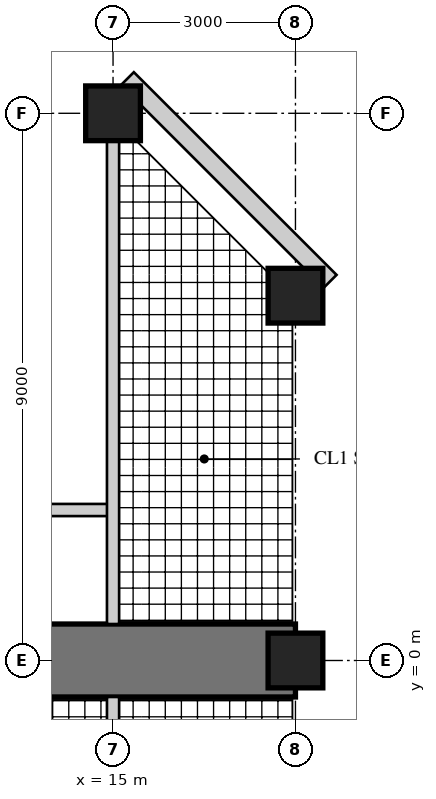
"""IFC4 building model, lengths in metres.
Left out: names, types, materials, properties, quantities, classifications, styles, units other than length and angle.
Written with IfcOpenShell. Run it as: python <this file> out.ifc"""

import sys

from ifc_helpers import new_model, si_unit, direction, frame, frame_2d, origin, origin_2d, place, context, subcontext, project, spatial, rectangle, hollow_rectangle, extrude, element, fill, save


model = new_model("IFC4")
c1 = context("Model", 3, precision=1e-05, world=origin(), true_north=direction((0.0, 1.0)))
c2 = subcontext(c1, "Body", "Model", "MODEL_VIEW")
j1 = project(units=[si_unit("LENGTHUNIT", "METRE"), si_unit("PLANEANGLEUNIT", "RADIAN")], contexts=[c1])
p1 = place(None, origin())
s1 = spatial("IfcSite", under=j1, at=p1, CompositionType="ELEMENT")
p2 = place(p1, origin())
s2 = spatial("IfcBuilding", under=s1, at=p2, CompositionType="ELEMENT")
p3 = place(p2, frame((0.0, 0.0, 179.7)))
s3 = spatial("IfcBuildingStorey", under=s2, at=p3, CompositionType="ELEMENT", Elevation=179.7)
p4 = place(p3, frame((9.0, 0.0, 0.0), z_axis=(0.0, 0.0, 1.0), x_axis=(1.0, 0.0, 0.0)))
e1 = element("IfcWall", 1, at=p4, inside=s3, PredefinedType="SHEAR", context=c2, shape_type="SweptSolid", body=[
    extrude(rectangle(XDim=9.0, YDim=1.2, at=frame_2d((4.5, 0.0))), origin(), (0.0, 0.0, 1.0), 3.4),
])
p5 = place(p4, frame((3.95, 0.0, 0.0)))
e2 = element("IfcOpeningElement", 2, at=p5, cuts=e1, PredefinedType="OPENING", context=c2, shape_type="SweptSolid", body=[
    extrude(rectangle(XDim=1.0, YDim=2.15, at=frame_2d((0.5, 1.075))), frame((0.0, 0.61, 0.0), z_axis=(0.0, -1.0, 0.0), x_axis=(1.0, 0.0, 0.0)), (0.0, 0.0, 1.0), 1.22),
])
p6 = place(p4, frame((7.0, 0.0, 0.0)))
e3 = element("IfcOpeningElement", 3, at=p6, cuts=e1, PredefinedType="OPENING", context=c2, shape_type="SweptSolid", body=[
    extrude(rectangle(XDim=1.0, YDim=2.2, at=frame_2d((0.5, 1.1))), frame((0.0, 0.61, 0.0), z_axis=(0.0, -1.0, 0.0), x_axis=(1.0, 0.0, 0.0)), (0.0, 0.0, 1.0), 1.22),
])
for number, where, z_axis, x_axis in (
    (4, (15.0, 9.0, 0.0), (0.0, 0.0, 1.0), (1.0, 0.0, 0.0)),
    (5, (18.0, 0.0, 0.0), (0.0, 0.0, 1.0), (1.0, 0.0, 0.0)),
    (6, (18.0, 6.0, 0.0), (0.0, 0.0, 1.0), (1.0, 0.0, 0.0)),
):
    element("IfcColumn", number, at=place(p3, frame(where, z_axis=z_axis, x_axis=x_axis)), inside=s3, PredefinedType="COLUMN", context=c2, shape_type="SweptSolid", body=[
        extrude(rectangle(XDim=0.9, YDim=0.9, at=origin_2d()), origin(), (0.0, 0.0, 1.0), 3.4),
    ])
p7 = place(p3, frame((18.57, 6.236, 0.0), z_axis=(0.0, 0.0, 1.0), x_axis=(-0.707106781187, 0.707106781187, 0.0)))
e7 = element("IfcWall", 7, at=p7, inside=s3, PredefinedType="SOLIDWALL", context=c2, shape_type="SweptSolid", body=[
    extrude(rectangle(XDim=4.715, YDim=0.3, at=frame_2d((2.357, 0.0))), origin(), (0.0, 0.0, 1.0), 3.22),
])
p8 = place(p7, frame((1.907, 0.0, 0.3)))
e8 = element("IfcOpeningElement", 8, at=p8, cuts=e7, PredefinedType="OPENING", context=c2, shape_type="SweptSolid", body=[
    extrude(rectangle(XDim=0.9, YDim=2.4, at=frame_2d((0.45, 1.2))), frame((0.0, 0.16, 0.0), z_axis=(0.0, -1.0, 0.0), x_axis=(1.0, 0.0, 0.0)), (0.0, 0.0, 1.0), 0.32),
])
p9 = place(p3, frame((9.55, 2.475, 0.0), z_axis=(0.0, 0.0, 1.0), x_axis=(1.0, 0.0, 0.0)))
e9 = element("IfcWall", 9, at=p9, inside=s3, PredefinedType="SOLIDWALL", context=c2, shape_type="SweptSolid", body=[
    extrude(rectangle(XDim=5.45, YDim=0.2, at=frame_2d((2.725, 0.0))), origin(), (0.0, 0.0, 1.0), 3.22),
])
p10 = place(p9, frame((3.6, 0.0, 0.0)))
e10 = element("IfcOpeningElement", 10, at=p10, cuts=e9, PredefinedType="OPENING", context=c2, shape_type="SweptSolid", body=[
    extrude(rectangle(XDim=1.0, YDim=2.15, at=frame_2d((0.5, 1.075))), frame((0.0, 0.11, 0.0), z_axis=(0.0, -1.0, 0.0), x_axis=(1.0, 0.0, 0.0)), (0.0, 0.0, 1.0), 0.22),
])
p11 = place(p3, frame((15.0, -8.55, 0.0), z_axis=(0.0, 0.0, 1.0), x_axis=(0.0, 1.0, 0.0)))
e11 = element("IfcWall", 11, at=p11, inside=s3, PredefinedType="SOLIDWALL", context=c2, shape_type="SweptSolid", body=[
    extrude(rectangle(XDim=7.95, YDim=0.2, at=frame_2d((3.975, 0.0))), origin(), (0.0, 0.0, 1.0), 2.47),
])
p12 = place(p3, frame((15.0, 0.6, 0.0), z_axis=(0.0, 0.0, 1.0), x_axis=(0.0, 1.0, 0.0)))
e12 = element("IfcWall", 12, at=p12, inside=s3, PredefinedType="SOLIDWALL", context=c2, shape_type="SweptSolid", body=[
    extrude(rectangle(XDim=7.95, YDim=0.2, at=frame_2d((3.975, 0.0))), origin(), (0.0, 0.0, 1.0), 2.47),
])
p13 = place(p12, frame((0.35, 0.0, 0.0)))
e13 = element("IfcOpeningElement", 13, at=p13, cuts=e12, PredefinedType="OPENING", context=c2, shape_type="SweptSolid", body=[
    extrude(rectangle(XDim=1.0, YDim=2.2, at=frame_2d((0.5, 1.1))), frame((0.0, 0.11, 0.0), z_axis=(0.0, -1.0, 0.0), x_axis=(1.0, 0.0, 0.0)), (0.0, 0.0, 1.0), 0.22),
])
p14 = place(p8, origin())
e14 = element("IfcWindow", 14, at=p14, inside=s3, PartitioningType="SINGLE_PANEL", PredefinedType="WINDOW", context=c2, shape_type="SweptSolid", body=[
    extrude(hollow_rectangle(XDim=0.9, YDim=2.4, WallThickness=0.06, at=frame_2d((0.45, 1.2))), frame((0.0, 0.03, 0.0), z_axis=(0.0, -1.0, 0.0), x_axis=(1.0, 0.0, 0.0)), (0.0, 0.0, 1.0), 0.06),
    extrude(rectangle(XDim=0.779, YDim=2.279, at=frame_2d((0.45, 1.2))), frame((0.0, 0.03, 0.0), z_axis=(0.0, -1.0, 0.0), x_axis=(1.0, 0.0, 0.0)), (0.0, 0.0, 1.0), 0.06),
])
fill(e8, e14)
p15 = place(p10, origin())
e15 = element("IfcDoor", 15, at=p15, inside=s3, OperationType="SINGLE_SWING_LEFT", PredefinedType="DOOR", context=c2, shape_type="SweptSolid", body=[
    extrude(rectangle(XDim=1.0, YDim=2.15, at=frame_2d((0.5, 1.075))), frame((0.0, 0.025, 0.0), z_axis=(0.0, -1.0, 0.0), x_axis=(1.0, 0.0, 0.0)), (0.0, 0.0, 1.0), 0.05),
])
fill(e10, e15)
p16 = place(p13, frame((1.0, 0.0, 0.0), z_axis=(0.0, 0.0, 1.0), x_axis=(-1.0, 0.0, 0.0)))
e16 = element("IfcDoor", 16, at=p16, inside=s3, OperationType="SINGLE_SWING_LEFT", PredefinedType="DOOR", context=c2, shape_type="SweptSolid", body=[
    extrude(rectangle(XDim=1.0, YDim=2.2, at=frame_2d((0.5, 1.1))), frame((0.0, 0.025, 0.0), z_axis=(0.0, -1.0, 0.0), x_axis=(1.0, 0.0, 0.0)), (0.0, 0.0, 1.0), 0.05),
])
fill(e13, e16)
p17 = place(p6, origin())
e17 = element("IfcDoor", 17, at=p17, inside=s3, OperationType="SINGLE_SWING_LEFT", PredefinedType="DOOR", context=c2, shape_type="SweptSolid", body=[
    extrude(rectangle(XDim=1.0, YDim=2.2, at=frame_2d((0.5, 1.1))), frame((0.0, 0.025, 0.0), z_axis=(0.0, -1.0, 0.0), x_axis=(1.0, 0.0, 0.0)), (0.0, 0.0, 1.0), 0.05),
])
fill(e3, e17)
save(model, sys.argv[1])
